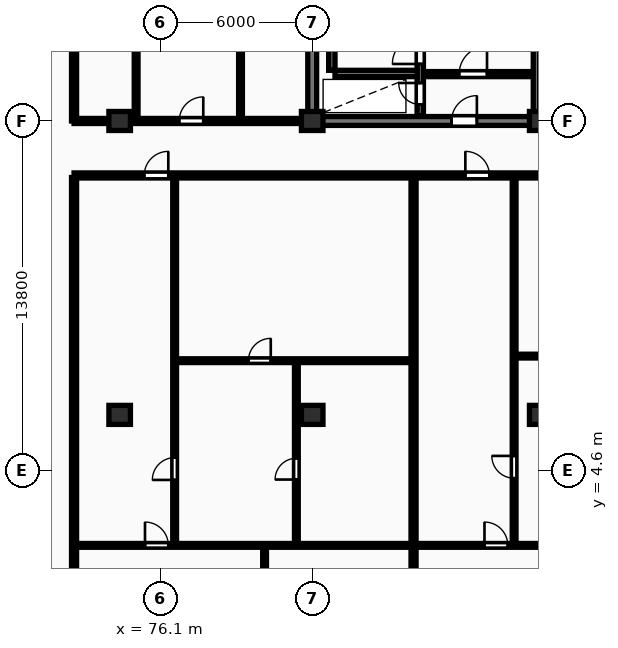
"""IFC4 building model, lengths in metres.
Left out: names, types, materials, properties, quantities, classifications, styles, units other than length and angle.
Written with IfcOpenShell. Run it as: python <this file> out.ifc"""

import sys

from ifc_helpers import new_model, si_unit, direction, frame, frame_2d, origin, origin_2d, place, context, subcontext, project, spatial, rectangle, extrude, element, fill, save


model = new_model("IFC4")
c1 = context("Model", 3, precision=1e-05, world=origin(), true_north=direction((0.0, 1.0)))
c2 = subcontext(c1, "Body", "Model", "MODEL_VIEW")
j1 = project(units=[si_unit("LENGTHUNIT", "METRE"), si_unit("PLANEANGLEUNIT", "RADIAN")], contexts=[c1])
p1 = place(None, origin())
s1 = spatial("IfcSite", under=j1, at=p1, CompositionType="ELEMENT")
p2 = place(p1, origin())
s2 = spatial("IfcBuilding", under=s1, at=p2, CompositionType="ELEMENT")
p3 = place(p2, frame((0.0, 0.0, 87.3)))
s3 = spatial("IfcBuildingStorey", under=s2, at=p3, CompositionType="ELEMENT", Elevation=87.3)
for number, where, z_axis, x_axis in (
    (1, (74.5, 6.8, 0.0), (0.0, 0.0, 1.0), (1.0, 0.0, 0.0)),
    (2, (74.5, 18.4, 0.0), (0.0, 0.0, 1.0), (1.0, 0.0, 0.0)),
    (3, (82.1, 6.8, 0.0), (0.0, 0.0, 1.0), (1.0, 0.0, 0.0)),
    (4, (82.1, 18.4, 0.0), (0.0, 0.0, 1.0), (1.0, 0.0, 0.0)),
    (5, (91.1, 6.8, 0.0), (0.0, 0.0, 1.0), (1.0, 0.0, 0.0)),
    (6, (91.1, 18.4, 0.0), (0.0, 0.0, 1.0), (1.0, 0.0, 0.0)),
):
    element("IfcColumn", number, at=place(p3, frame(where, z_axis=z_axis, x_axis=x_axis)), inside=s3, PredefinedType="COLUMN", context=c2, shape_type="SweptSolid", body=[
        extrude(rectangle(XDim=0.85, YDim=0.75, at=origin_2d()), origin(), (0.0, 0.0, 1.0), 3.25),
    ])
p4 = place(p3, frame((82.1, 18.575, 0.0), z_axis=(0.0, 0.0, 1.0), x_axis=(0.0, 1.0, 0.0)))
e7 = element("IfcWall", 7, at=p4, inside=s3, PredefinedType="SHEAR", context=c2, shape_type="SweptSolid", body=[
    extrude(rectangle(XDim=11.65, YDim=0.35, at=frame_2d((5.825, 0.0))), origin(), (0.0, 0.0, 1.0), 3.25),
])
p5 = place(p3, frame((81.925, 18.4, 0.0), z_axis=(0.0, 0.0, 1.0), x_axis=(1.0, 0.0, 0.0)))
e8 = element("IfcWall", 8, at=p5, inside=s3, PredefinedType="SHEAR", context=c2, shape_type="SweptSolid", body=[
    extrude(rectangle(XDim=36.265, YDim=0.35, at=frame_2d((18.132, 0.0))), origin(), (0.0, 0.0, 1.0), 3.25),
])
p6 = place(p5, frame((5.675, 0.0, 0.0)))
e9 = element("IfcOpeningElement", 9, at=p6, cuts=e8, PredefinedType="OPENING", context=c2, shape_type="SweptSolid", body=[
    extrude(rectangle(XDim=1.0, YDim=2.15, at=frame_2d((0.5, 1.075))), frame((0.0, 0.185, 0.0), z_axis=(0.0, -1.0, 0.0), x_axis=(1.0, 0.0, 0.0)), (0.0, 0.0, 1.0), 0.37),
])
p7 = place(p5, frame((21.925, 0.0, 0.0)))
e10 = element("IfcOpeningElement", 10, at=p7, cuts=e8, PredefinedType="OPENING", context=c2, shape_type="SweptSolid", body=[
    extrude(rectangle(XDim=1.5, YDim=2.2, at=frame_2d((0.75, 1.1))), frame((0.0, 0.185, 0.0), z_axis=(0.0, -1.0, 0.0), x_axis=(1.0, 0.0, 0.0)), (0.0, 0.0, 1.0), 0.37),
])
p8 = place(p5, frame((29.875, 0.0, 0.0)))
e11 = element("IfcOpeningElement", 11, at=p8, cuts=e8, PredefinedType="OPENING", context=c2, shape_type="SweptSolid", body=[
    extrude(rectangle(XDim=1.0, YDim=2.15, at=frame_2d((0.5, 1.075))), frame((0.0, 0.185, 0.0), z_axis=(0.0, -1.0, 0.0), x_axis=(1.0, 0.0, 0.0)), (0.0, 0.0, 1.0), 0.37),
])
p9 = place(p3, frame((82.875, 20.4, 0.0), z_axis=(0.0, 0.0, 1.0), x_axis=(0.0, 1.0, 0.0)))
e12 = element("IfcWall", 12, at=p9, inside=s3, PredefinedType="SHEAR", context=c2, shape_type="SweptSolid", body=[
    extrude(rectangle(XDim=7.6, YDim=0.25, at=frame_2d((3.8, 0.0))), origin(), (0.0, 0.0, 1.0), 3.25),
])
p10 = place(p3, frame((86.365, 18.6, 0.0), z_axis=(0.0, 0.0, 1.0), x_axis=(0.0, 1.0, 0.0)))
e13 = element("IfcWall", 13, at=p10, inside=s3, PredefinedType="SHEAR", context=c2, shape_type="SweptSolid", body=[
    extrude(rectangle(XDim=11.6, YDim=0.25, at=frame_2d((5.8, 0.0))), origin(), (0.0, 0.0, 1.0), 3.25),
])
p11 = place(p10, frame((0.45, 0.0, 0.0)))
e14 = element("IfcOpeningElement", 14, at=p11, cuts=e13, PredefinedType="OPENING", context=c2, shape_type="SweptSolid", body=[
    extrude(rectangle(XDim=0.85, YDim=2.05, at=frame_2d((0.425, 1.025))), frame((0.0, 0.135, 0.0), z_axis=(0.0, -1.0, 0.0), x_axis=(1.0, 0.0, 0.0)), (0.0, 0.0, 1.0), 0.27),
])
p12 = place(p10, frame((2.05, 0.0, 0.0)))
e15 = element("IfcOpeningElement", 15, at=p12, cuts=e13, PredefinedType="OPENING", context=c2, shape_type="SweptSolid", body=[
    extrude(rectangle(XDim=1.1, YDim=2.1, at=frame_2d((0.55, 1.05))), frame((0.0, 0.135, 0.0), z_axis=(0.0, -1.0, 0.0), x_axis=(1.0, 0.0, 0.0)), (0.0, 0.0, 1.0), 0.27),
])
p13 = place(p10, frame((9.95, 0.0, 0.0)))
e16 = element("IfcOpeningElement", 16, at=p13, cuts=e13, PredefinedType="OPENING", context=c2, shape_type="SweptSolid", body=[
    extrude(rectangle(XDim=0.85, YDim=2.05, at=frame_2d((0.425, 1.025))), frame((0.0, 0.135, 0.0), z_axis=(0.0, -1.0, 0.0), x_axis=(1.0, 0.0, 0.0)), (0.0, 0.0, 1.0), 0.27),
])
p14 = place(p3, frame((83.0, 20.275, 0.0), z_axis=(0.0, 0.0, 1.0), x_axis=(1.0, 0.0, 0.0)))
e17 = element("IfcWall", 17, at=p14, inside=s3, PredefinedType="SHEAR", context=c2, shape_type="SweptSolid", body=[
    extrude(rectangle(XDim=3.24, YDim=0.25, at=frame_2d((1.62, 0.0))), origin(), (0.0, 0.0, 1.0), 3.25),
])
p15 = place(p3, frame((86.5, 20.25, 0.0), z_axis=(0.0, 0.0, 1.0), x_axis=(1.0, 0.0, 0.0)))
e18 = element("IfcWall", 18, at=p15, inside=s3, PredefinedType="PARTITIONING", context=c2, shape_type="SweptSolid", body=[
    extrude(rectangle(XDim=4.32, YDim=0.2, at=frame_2d((2.16, 0.0))), origin(), (0.0, 0.0, 1.0), 2.97),
])
p16 = place(p15, frame((1.4, 0.0, 0.0)))
e19 = element("IfcOpeningElement", 19, at=p16, cuts=e18, PredefinedType="OPENING", context=c2, shape_type="SweptSolid", body=[
    extrude(rectangle(XDim=1.1, YDim=2.1, at=frame_2d((0.55, 1.05))), frame((0.0, 0.11, 0.0), z_axis=(0.0, -1.0, 0.0), x_axis=(1.0, 0.0, 0.0)), (0.0, 0.0, 1.0), 0.22),
])
p17 = place(p3, frame((90.95, 18.6, 0.0), z_axis=(0.0, 0.0, 1.0), x_axis=(0.0, 1.0, 0.0)))
e20 = element("IfcWall", 20, at=p17, inside=s3, PredefinedType="SHEAR", context=c2, shape_type="SweptSolid", body=[
    extrude(rectangle(XDim=11.6, YDim=0.25, at=frame_2d((5.8, 0.0))), origin(), (0.0, 0.0, 1.0), 3.25),
])
p18 = place(p17, frame((4.6, 0.0, 0.0)))
e21 = element("IfcOpeningElement", 21, at=p18, cuts=e20, PredefinedType="OPENING", context=c2, shape_type="SweptSolid", body=[
    extrude(rectangle(XDim=1.1, YDim=2.1, at=frame_2d((0.55, 1.05))), frame((0.0, 0.135, 0.0), z_axis=(0.0, -1.0, 0.0), x_axis=(1.0, 0.0, 0.0)), (0.0, 0.0, 1.0), 0.27),
])
p19 = place(p3, frame((72.7, 18.4, 0.0), z_axis=(0.0, 0.0, 1.0), x_axis=(0.0, 1.0, 0.0)))
e22 = element("IfcWall", 22, at=p19, inside=s3, PredefinedType="PARTITIONING", context=c2, shape_type="SweptSolid", body=[
    extrude(rectangle(XDim=14.1, YDim=0.2, at=frame_2d((7.05, 0.0))), origin(), (0.0, 0.0, 1.0), 2.97),
])
p20 = place(p3, frame((75.15, 18.45, 0.0), z_axis=(0.0, 0.0, 1.0), x_axis=(0.0, 1.0, 0.0)))
e23 = element("IfcWall", 23, at=p20, inside=s3, PredefinedType="PARTITIONING", context=c2, shape_type="SweptSolid", body=[
    extrude(rectangle(XDim=14.05, YDim=0.15, at=frame_2d((7.025, 0.0))), origin(), (0.0, 0.0, 1.0), 2.97),
])
p21 = place(p20, frame((3.32, 0.0, 0.0)))
e24 = element("IfcOpeningElement", 24, at=p21, cuts=e23, PredefinedType="OPENING", context=c2, shape_type="SweptSolid", body=[
    extrude(rectangle(XDim=0.88, YDim=2.06, at=frame_2d((0.44, 1.03))), frame((0.0, 0.085, 0.0), z_axis=(0.0, -1.0, 0.0), x_axis=(1.0, 0.0, 0.0)), (0.0, 0.0, 1.0), 0.17),
])
p22 = place(p3, frame((79.27, 18.45, 0.0), z_axis=(0.0, 0.0, 1.0), x_axis=(0.0, 1.0, 0.0)))
e25 = element("IfcWall", 25, at=p22, inside=s3, PredefinedType="PARTITIONING", context=c2, shape_type="SweptSolid", body=[
    extrude(rectangle(XDim=9.12, YDim=0.15, at=frame_2d((4.56, 0.0))), origin(), (0.0, 0.0, 1.0), 2.97),
])
p23 = place(p22, frame((4.1, 0.0, 0.0)))
e26 = element("IfcOpeningElement", 26, at=p23, cuts=e25, PredefinedType="OPENING", context=c2, shape_type="SweptSolid", body=[
    extrude(rectangle(XDim=0.92, YDim=2.08, at=frame_2d((0.46, 1.04))), frame((0.0, 0.085, 0.0), z_axis=(0.0, -1.0, 0.0), x_axis=(1.0, 0.0, 0.0)), (0.0, 0.0, 1.0), 0.17),
])
p24 = place(p3, frame((72.7, 18.4, 0.0), z_axis=(0.0, 0.0, 1.0), x_axis=(1.0, 0.0, 0.0)))
e27 = element("IfcWall", 27, at=p24, inside=s3, PredefinedType="PARTITIONING", context=c2, shape_type="SweptSolid", body=[
    extrude(rectangle(XDim=9.25, YDim=0.2, at=frame_2d((4.625, 0.0))), origin(), (0.0, 0.0, 1.0), 2.358),
])
p25 = place(p24, frame((4.15, 0.0, 0.0)))
e28 = element("IfcOpeningElement", 28, at=p25, cuts=e27, PredefinedType="OPENING", context=c2, shape_type="SweptSolid", body=[
    extrude(rectangle(XDim=0.95, YDim=2.15, at=frame_2d((0.475, 1.075))), frame((0.0, 0.11, 0.0), z_axis=(0.0, -1.0, 0.0), x_axis=(1.0, 0.0, 0.0)), (0.0, 0.0, 1.0), 0.22),
])
for number, where, z_axis, x_axis in (
    (29, (72.7, -8.7, 0.0), (0.0, 0.0, 1.0), (0.0, 1.0, 0.0)),
    (30, (86.1, -8.7, 0.0), (0.0, 0.0, 1.0), (0.0, 1.0, 0.0)),
):
    element("IfcWall", number, at=place(p3, frame(where, z_axis=z_axis, x_axis=x_axis)), inside=s3, PredefinedType="PARTITIONING", context=c2, shape_type="SweptSolid", body=[
        extrude(rectangle(XDim=24.87, YDim=0.2, at=frame_2d((12.435, 0.0))), origin(), (0.0, 0.0, 1.0), 2.97),
    ])
p26 = place(p3, frame((81.475, 1.69, 0.0), z_axis=(0.0, 0.0, 1.0), x_axis=(0.0, 1.0, 0.0)))
e31 = element("IfcWall", 31, at=p26, inside=s3, PredefinedType="PARTITIONING", context=c2, shape_type="SweptSolid", body=[
    extrude(rectangle(XDim=7.25, YDim=0.15, at=frame_2d((3.625, 0.0))), origin(), (0.0, 0.0, 1.0), 2.97),
])
p27 = place(p26, frame((2.558, 0.0, 0.0)))
e32 = element("IfcOpeningElement", 32, at=p27, cuts=e31, PredefinedType="OPENING", context=c2, shape_type="SweptSolid", body=[
    extrude(rectangle(XDim=0.84, YDim=2.04, at=frame_2d((0.42, 1.02))), frame((0.0, 0.085, 0.0), z_axis=(0.0, -1.0, 0.0), x_axis=(1.0, 0.0, 0.0)), (0.0, 0.0, 1.0), 0.17),
])
p28 = place(p3, frame((76.73, 8.94, 0.0), z_axis=(0.0, 0.0, 1.0), x_axis=(1.0, 0.0, 0.0)))
e33 = element("IfcWall", 33, at=p28, inside=s3, PredefinedType="PARTITIONING", context=c2, shape_type="SweptSolid", body=[
    extrude(rectangle(XDim=9.29, YDim=0.15, at=frame_2d((4.645, 0.0))), origin(), (0.0, 0.0, 1.0), 2.97),
])
p29 = place(p28, frame((2.854, 0.0, 0.0)))
e34 = element("IfcOpeningElement", 34, at=p29, cuts=e33, PredefinedType="OPENING", context=c2, shape_type="SweptSolid", body=[
    extrude(rectangle(XDim=0.88, YDim=2.06, at=frame_2d((0.44, 1.03))), frame((0.0, 0.085, 0.0), z_axis=(0.0, -1.0, 0.0), x_axis=(1.0, 0.0, 0.0)), (0.0, 0.0, 1.0), 0.17),
])
p30 = place(p3, frame((76.67, 1.69, 0.0), z_axis=(0.0, 0.0, 1.0), x_axis=(0.0, 1.0, 0.0)))
e35 = element("IfcWall", 35, at=p30, inside=s3, PredefinedType="PARTITIONING", context=c2, shape_type="SweptSolid", body=[
    extrude(rectangle(XDim=14.5, YDim=0.15, at=frame_2d((7.25, 0.0))), origin(), (0.0, 0.0, 1.0), 2.97),
])
p31 = place(p30, frame((2.542, 0.0, 0.0)))
e36 = element("IfcOpeningElement", 36, at=p31, cuts=e35, PredefinedType="OPENING", context=c2, shape_type="SweptSolid", body=[
    extrude(rectangle(XDim=0.88, YDim=2.06, at=frame_2d((0.44, 1.03))), frame((0.0, 0.085, 0.0), z_axis=(0.0, -1.0, 0.0), x_axis=(1.0, 0.0, 0.0)), (0.0, 0.0, 1.0), 0.17),
])
p32 = place(p3, frame((80.22, -8.7, 0.0), z_axis=(0.0, 0.0, 1.0), x_axis=(0.0, 1.0, 0.0)))
e37 = element("IfcWall", 37, at=p32, inside=s3, PredefinedType="PARTITIONING", context=c2, shape_type="SweptSolid", body=[
    extrude(rectangle(XDim=10.31, YDim=0.15, at=frame_2d((5.155, 0.0))), origin(), (0.0, 0.0, 1.0), 2.97),
])
p33 = place(p32, frame((6.12, 0.0, 0.0)))
e38 = element("IfcOpeningElement", 38, at=p33, cuts=e37, PredefinedType="OPENING", context=c2, shape_type="SweptSolid", body=[
    extrude(rectangle(XDim=0.84, YDim=2.04, at=frame_2d((0.42, 1.02))), frame((0.0, 0.085, 0.0), z_axis=(0.0, -1.0, 0.0), x_axis=(1.0, 0.0, 0.0)), (0.0, 0.0, 1.0), 0.17),
])
p34 = place(p32, frame((8.04, 0.0, 0.0)))
e39 = element("IfcOpeningElement", 39, at=p34, cuts=e37, PredefinedType="OPENING", context=c2, shape_type="SweptSolid", body=[
    extrude(rectangle(XDim=0.84, YDim=2.04, at=frame_2d((0.42, 1.02))), frame((0.0, 0.085, 0.0), z_axis=(0.0, -1.0, 0.0), x_axis=(1.0, 0.0, 0.0)), (0.0, 0.0, 1.0), 0.17),
])
p35 = place(p32, frame((2.001, 0.0, 0.0)))
e40 = element("IfcOpeningElement", 40, at=p35, cuts=e37, PredefinedType="OPENING", context=c2, shape_type="SweptSolid", body=[
    extrude(rectangle(XDim=0.88, YDim=2.06, at=frame_2d((0.44, 1.03))), frame((0.0, 0.085, 0.0), z_axis=(0.0, -1.0, 0.0), x_axis=(1.0, 0.0, 0.0)), (0.0, 0.0, 1.0), 0.17),
])
p36 = place(p3, frame((72.78, 1.65, 0.0), z_axis=(0.0, 0.0, 1.0), x_axis=(1.0, 0.0, 0.0)))
e41 = element("IfcWall", 41, at=p36, inside=s3, PredefinedType="PARTITIONING", context=c2, shape_type="SweptSolid", body=[
    extrude(rectangle(XDim=13.24, YDim=0.15, at=frame_2d((6.62, 0.0))), origin(), (0.0, 0.0, 1.0), 2.97),
])
p37 = place(p36, frame((2.72, 0.0, 0.0)))
e42 = element("IfcOpeningElement", 42, at=p37, cuts=e41, PredefinedType="OPENING", context=c2, shape_type="SweptSolid", body=[
    extrude(rectangle(XDim=0.92, YDim=2.08, at=frame_2d((0.46, 1.04))), frame((0.0, 0.085, 0.0), z_axis=(0.0, -1.0, 0.0), x_axis=(1.0, 0.0, 0.0)), (0.0, 0.0, 1.0), 0.17),
])
p38 = place(p3, frame((90.13, 9.12, 0.0), z_axis=(0.0, 0.0, 1.0), x_axis=(1.0, 0.0, 0.0)))
e43 = element("IfcWall", 43, at=p38, inside=s3, PredefinedType="PARTITIONING", context=c2, shape_type="SweptSolid", body=[
    extrude(rectangle(XDim=13.69, YDim=0.15, at=frame_2d((6.845, 0.0))), origin(), (0.0, 0.0, 1.0), 2.97),
])
p39 = place(p38, frame((5.625, 0.0, 0.0)))
e44 = element("IfcOpeningElement", 44, at=p39, cuts=e43, PredefinedType="OPENING", context=c2, shape_type="SweptSolid", body=[
    extrude(rectangle(XDim=0.88, YDim=2.06, at=frame_2d((0.44, 1.03))), frame((0.0, 0.085, 0.0), z_axis=(0.0, -1.0, 0.0), x_axis=(1.0, 0.0, 0.0)), (0.0, 0.0, 1.0), 0.17),
])
p40 = place(p3, frame((90.07, 1.69, 0.0), z_axis=(0.0, 0.0, 1.0), x_axis=(0.0, 1.0, 0.0)))
e45 = element("IfcWall", 45, at=p40, inside=s3, PredefinedType="PARTITIONING", context=c2, shape_type="SweptSolid", body=[
    extrude(rectangle(XDim=14.5, YDim=0.15, at=frame_2d((7.25, 0.0))), origin(), (0.0, 0.0, 1.0), 2.97),
])
p41 = place(p40, frame((2.611, 0.0, 0.0)))
e46 = element("IfcOpeningElement", 46, at=p41, cuts=e45, PredefinedType="OPENING", context=c2, shape_type="SweptSolid", body=[
    extrude(rectangle(XDim=0.88, YDim=2.06, at=frame_2d((0.44, 1.03))), frame((0.0, 0.085, 0.0), z_axis=(0.0, -1.0, 0.0), x_axis=(1.0, 0.0, 0.0)), (0.0, 0.0, 1.0), 0.17),
])
p42 = place(p3, frame((86.18, 1.65, 0.0), z_axis=(0.0, 0.0, 1.0), x_axis=(1.0, 0.0, 0.0)))
e47 = element("IfcWall", 47, at=p42, inside=s3, PredefinedType="PARTITIONING", context=c2, shape_type="SweptSolid", body=[
    extrude(rectangle(XDim=17.64, YDim=0.15, at=frame_2d((8.82, 0.0))), origin(), (0.0, 0.0, 1.0), 2.97),
])
p43 = place(p42, frame((2.72, 0.0, 0.0)))
e48 = element("IfcOpeningElement", 48, at=p43, cuts=e47, PredefinedType="OPENING", context=c2, shape_type="SweptSolid", body=[
    extrude(rectangle(XDim=0.92, YDim=2.08, at=frame_2d((0.46, 1.04))), frame((0.0, 0.085, 0.0), z_axis=(0.0, -1.0, 0.0), x_axis=(1.0, 0.0, 0.0)), (0.0, 0.0, 1.0), 0.17),
])
p44 = place(p3, frame((72.7, 16.25, 0.0), z_axis=(0.0, 0.0, 1.0), x_axis=(1.0, 0.0, 0.0)))
e49 = element("IfcWall", 49, at=p44, inside=s3, PredefinedType="PARTITIONING", context=c2, shape_type="SweptSolid", body=[
    extrude(rectangle(XDim=58.0, YDim=0.2, at=frame_2d((29.0, 0.0))), origin(), (0.0, 0.0, 1.0), 2.97),
])
p45 = place(p44, frame((2.77, 0.0, 0.0)))
e50 = element("IfcOpeningElement", 50, at=p45, cuts=e49, PredefinedType="OPENING", context=c2, shape_type="SweptSolid", body=[
    extrude(rectangle(XDim=0.95, YDim=2.15, at=frame_2d((0.475, 1.075))), frame((0.0, 0.11, 0.0), z_axis=(0.0, -1.0, 0.0), x_axis=(1.0, 0.0, 0.0)), (0.0, 0.0, 1.0), 0.22),
])
p46 = place(p44, frame((15.445, 0.0, 0.0)))
e51 = element("IfcOpeningElement", 51, at=p46, cuts=e49, PredefinedType="OPENING", context=c2, shape_type="SweptSolid", body=[
    extrude(rectangle(XDim=0.95, YDim=2.15, at=frame_2d((0.475, 1.075))), frame((0.0, 0.11, 0.0), z_axis=(0.0, -1.0, 0.0), x_axis=(1.0, 0.0, 0.0)), (0.0, 0.0, 1.0), 0.22),
])
p47 = place(p44, frame((33.245, 0.0, 0.0)))
e52 = element("IfcOpeningElement", 52, at=p47, cuts=e49, PredefinedType="OPENING", context=c2, shape_type="SweptSolid", body=[
    extrude(rectangle(XDim=0.95, YDim=2.15, at=frame_2d((0.475, 1.075))), frame((0.0, 0.11, 0.0), z_axis=(0.0, -1.0, 0.0), x_axis=(1.0, 0.0, 0.0)), (0.0, 0.0, 1.0), 0.22),
])
p48 = place(p44, frame((47.645, 0.0, 0.0)))
e53 = element("IfcOpeningElement", 53, at=p48, cuts=e49, PredefinedType="OPENING", context=c2, shape_type="SweptSolid", body=[
    extrude(rectangle(XDim=0.95, YDim=2.15, at=frame_2d((0.475, 1.075))), frame((0.0, 0.11, 0.0), z_axis=(0.0, -1.0, 0.0), x_axis=(1.0, 0.0, 0.0)), (0.0, 0.0, 1.0), 0.22),
])
p49 = place(p6, origin())
e54 = element("IfcDoor", 54, at=p49, inside=s3, OperationType="SINGLE_SWING_RIGHT", PredefinedType="DOOR", context=c2, shape_type="SweptSolid", body=[
    extrude(rectangle(XDim=1.0, YDim=2.15, at=frame_2d((0.5, 1.075))), frame((0.0, 0.025, 0.0), z_axis=(0.0, -1.0, 0.0), x_axis=(1.0, 0.0, 0.0)), (0.0, 0.0, 1.0), 0.05),
])
fill(e9, e54)
p50 = place(p11, origin())
e55 = element("IfcDoor", 55, at=p50, inside=s3, OperationType="SINGLE_SWING_RIGHT", PredefinedType="DOOR", context=c2, shape_type="SweptSolid", body=[
    extrude(rectangle(XDim=0.85, YDim=2.05, at=frame_2d((0.425, 1.025))), frame((0.0, 0.025, 0.0), z_axis=(0.0, -1.0, 0.0), x_axis=(1.0, 0.0, 0.0)), (0.0, 0.0, 1.0), 0.05),
])
fill(e14, e55)
p51 = place(p12, origin())
e56 = element("IfcDoor", 56, at=p51, inside=s3, OperationType="SINGLE_SWING_LEFT", PredefinedType="DOOR", context=c2, shape_type="SweptSolid", body=[
    extrude(rectangle(XDim=1.1, YDim=2.1, at=frame_2d((0.55, 1.05))), frame((0.0, 0.025, 0.0), z_axis=(0.0, -1.0, 0.0), x_axis=(1.0, 0.0, 0.0)), (0.0, 0.0, 1.0), 0.05),
])
fill(e15, e56)
p52 = place(p16, origin())
e57 = element("IfcDoor", 57, at=p52, inside=s3, OperationType="SINGLE_SWING_RIGHT", PredefinedType="DOOR", context=c2, shape_type="SweptSolid", body=[
    extrude(rectangle(XDim=1.1, YDim=2.1, at=frame_2d((0.55, 1.05))), frame((0.0, 0.025, 0.0), z_axis=(0.0, -1.0, 0.0), x_axis=(1.0, 0.0, 0.0)), (0.0, 0.0, 1.0), 0.05),
])
fill(e19, e57)
p53 = place(p25, origin())
e58 = element("IfcDoor", 58, at=p53, inside=s3, OperationType="SINGLE_SWING_RIGHT", PredefinedType="DOOR", context=c2, shape_type="SweptSolid", body=[
    extrude(rectangle(XDim=0.95, YDim=2.15, at=frame_2d((0.475, 1.075))), frame((0.0, 0.025, 0.0), z_axis=(0.0, -1.0, 0.0), x_axis=(1.0, 0.0, 0.0)), (0.0, 0.0, 1.0), 0.05),
])
fill(e28, e58)
p54 = place(p27, origin())
e59 = element("IfcDoor", 59, at=p54, inside=s3, OperationType="SINGLE_SWING_LEFT", PredefinedType="DOOR", context=c2, shape_type="SweptSolid", body=[
    extrude(rectangle(XDim=0.84, YDim=2.04, at=frame_2d((0.42, 1.02))), frame((0.0, 0.025, 0.0), z_axis=(0.0, -1.0, 0.0), x_axis=(1.0, 0.0, 0.0)), (0.0, 0.0, 1.0), 0.05),
])
fill(e32, e59)
p55 = place(p29, origin())
e60 = element("IfcDoor", 60, at=p55, inside=s3, OperationType="SINGLE_SWING_RIGHT", PredefinedType="DOOR", context=c2, shape_type="SweptSolid", body=[
    extrude(rectangle(XDim=0.88, YDim=2.06, at=frame_2d((0.44, 1.03))), frame((0.0, 0.025, 0.0), z_axis=(0.0, -1.0, 0.0), x_axis=(1.0, 0.0, 0.0)), (0.0, 0.0, 1.0), 0.05),
])
fill(e34, e60)
p56 = place(p31, origin())
e61 = element("IfcDoor", 61, at=p56, inside=s3, OperationType="SINGLE_SWING_LEFT", PredefinedType="DOOR", context=c2, shape_type="SweptSolid", body=[
    extrude(rectangle(XDim=0.88, YDim=2.06, at=frame_2d((0.44, 1.03))), frame((0.0, 0.025, 0.0), z_axis=(0.0, -1.0, 0.0), x_axis=(1.0, 0.0, 0.0)), (0.0, 0.0, 1.0), 0.05),
])
fill(e36, e61)
p57 = place(p37, origin())
e62 = element("IfcDoor", 62, at=p57, inside=s3, OperationType="SINGLE_SWING_LEFT", PredefinedType="DOOR", context=c2, shape_type="SweptSolid", body=[
    extrude(rectangle(XDim=0.92, YDim=2.08, at=frame_2d((0.46, 1.04))), frame((0.0, 0.025, 0.0), z_axis=(0.0, -1.0, 0.0), x_axis=(1.0, 0.0, 0.0)), (0.0, 0.0, 1.0), 0.05),
])
fill(e42, e62)
p58 = place(p41, origin())
e63 = element("IfcDoor", 63, at=p58, inside=s3, OperationType="SINGLE_SWING_RIGHT", PredefinedType="DOOR", context=c2, shape_type="SweptSolid", body=[
    extrude(rectangle(XDim=0.88, YDim=2.06, at=frame_2d((0.44, 1.03))), frame((0.0, 0.025, 0.0), z_axis=(0.0, -1.0, 0.0), x_axis=(1.0, 0.0, 0.0)), (0.0, 0.0, 1.0), 0.05),
])
fill(e46, e63)
p59 = place(p43, origin())
e64 = element("IfcDoor", 64, at=p59, inside=s3, OperationType="SINGLE_SWING_LEFT", PredefinedType="DOOR", context=c2, shape_type="SweptSolid", body=[
    extrude(rectangle(XDim=0.92, YDim=2.08, at=frame_2d((0.46, 1.04))), frame((0.0, 0.025, 0.0), z_axis=(0.0, -1.0, 0.0), x_axis=(1.0, 0.0, 0.0)), (0.0, 0.0, 1.0), 0.05),
])
fill(e48, e64)
p60 = place(p45, origin())
e65 = element("IfcDoor", 65, at=p60, inside=s3, OperationType="SINGLE_SWING_RIGHT", PredefinedType="DOOR", context=c2, shape_type="SweptSolid", body=[
    extrude(rectangle(XDim=0.95, YDim=2.15, at=frame_2d((0.475, 1.075))), frame((0.0, 0.025, 0.0), z_axis=(0.0, -1.0, 0.0), x_axis=(1.0, 0.0, 0.0)), (0.0, 0.0, 1.0), 0.05),
])
fill(e50, e65)
p61 = place(p46, origin())
e66 = element("IfcDoor", 66, at=p61, inside=s3, OperationType="SINGLE_SWING_LEFT", PredefinedType="DOOR", context=c2, shape_type="SweptSolid", body=[
    extrude(rectangle(XDim=0.95, YDim=2.15, at=frame_2d((0.475, 1.075))), frame((0.0, 0.025, 0.0), z_axis=(0.0, -1.0, 0.0), x_axis=(1.0, 0.0, 0.0)), (0.0, 0.0, 1.0), 0.05),
])
fill(e51, e66)
save(model, sys.argv[1])
